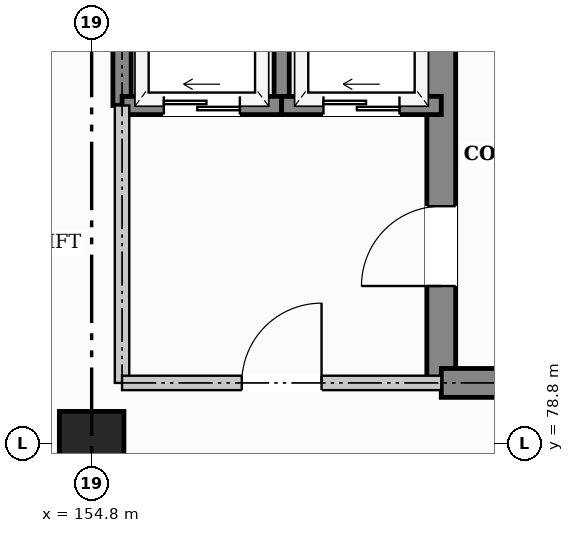
"""IFC4 building model, lengths in metres.
Left out: names, types, materials, properties, quantities, classifications, styles, units other than length and angle.
Written with IfcOpenShell. Run it as: python <this file> out.ifc"""

import sys

from ifc_helpers import new_model, si_unit, direction, frame, frame_2d, origin, origin_2d, place, context, subcontext, project, spatial, rectangle, extrude, element, fill, save


model = new_model("IFC4")
c1 = context("Model", 3, precision=1e-05, world=origin(), true_north=direction((0.0, 1.0)))
c2 = subcontext(c1, "Body", "Model", "MODEL_VIEW")
j1 = project(units=[si_unit("LENGTHUNIT", "METRE"), si_unit("PLANEANGLEUNIT", "RADIAN")], contexts=[c1])
p1 = place(None, origin())
s1 = spatial("IfcSite", under=j1, at=p1, CompositionType="ELEMENT")
p2 = place(p1, origin())
s2 = spatial("IfcBuilding", under=s1, at=p2, CompositionType="ELEMENT")
p3 = place(p2, frame((0.0, 0.0, 5.1)))
s3 = spatial("IfcBuildingStorey", under=s2, at=p3, CompositionType="ELEMENT", Elevation=5.1)
p4 = place(p3, frame((154.8, 78.8, 0.0), z_axis=(0.0, 0.0, 1.0), x_axis=(1.0, 0.0, 0.0)))
e1 = element("IfcColumn", 1, at=p4, inside=s3, PredefinedType="COLUMN", context=c2, shape_type="SweptSolid", body=[
    extrude(rectangle(XDim=0.85, YDim=0.85, at=origin_2d()), origin(), (0.0, 0.0, 1.0), 4.5),
])
p5 = place(p3, frame((159.4, 79.6, 0.0), z_axis=(0.0, 0.0, 1.0), x_axis=(0.0, 1.0, 0.0)))
e2 = element("IfcWall", 2, at=p5, inside=s3, PredefinedType="SHEAR", context=c2, shape_type="SweptSolid", body=[
    extrude(rectangle(XDim=6.0, YDim=0.38, at=frame_2d((3.0, 0.0))), origin(), (0.0, 0.0, 1.0), 4.22),
])
p6 = place(p5, frame((1.275, 0.0, 0.0)))
e3 = element("IfcOpeningElement", 3, at=p6, cuts=e2, PredefinedType="OPENING", context=c2, shape_type="SweptSolid", body=[
    extrude(rectangle(XDim=1.05, YDim=2.15, at=frame_2d((0.525, 1.075))), frame((0.0, 0.2, 0.0), z_axis=(0.0, -1.0, 0.0), x_axis=(1.0, 0.0, 0.0)), (0.0, 0.0, 1.0), 0.4),
])
p7 = place(p3, frame((159.4, 79.6, 0.0), z_axis=(0.0, 0.0, 1.0), x_axis=(1.0, 0.0, 0.0)))
e4 = element("IfcWall", 4, at=p7, inside=s3, PredefinedType="SHEAR", context=c2, shape_type="SweptSolid", body=[
    extrude(rectangle(XDim=7.0, YDim=0.38, at=frame_2d((3.5, 0.0))), origin(), (0.0, 0.0, 1.0), 4.22),
])
p8 = place(p3, frame((155.2, 83.25, 0.0), z_axis=(0.0, 0.0, 1.0), x_axis=(0.0, 1.0, 0.0)))
e5 = element("IfcWall", 5, at=p8, inside=s3, PredefinedType="SHEAR", context=c2, shape_type="SweptSolid", body=[
    extrude(rectangle(XDim=2.35, YDim=0.24, at=frame_2d((1.175, 0.0))), origin(), (0.0, 0.0, 1.0), 4.22),
])
p9 = place(p3, frame((157.3, 83.25, 0.0), z_axis=(0.0, 0.0, 1.0), x_axis=(0.0, 1.0, 0.0)))
e6 = element("IfcWall", 6, at=p9, inside=s3, PredefinedType="SHEAR", context=c2, shape_type="SweptSolid", body=[
    extrude(rectangle(XDim=2.35, YDim=0.2, at=frame_2d((1.175, 0.0))), origin(), (0.0, 0.0, 1.0), 4.22),
])
p10 = place(p3, frame((155.2, 83.25, 0.0), z_axis=(0.0, 0.0, 1.0), x_axis=(1.0, 0.0, 0.0)))
e7 = element("IfcWall", 7, at=p10, inside=s3, PredefinedType="SHEAR", context=c2, shape_type="SweptSolid", body=[
    extrude(rectangle(XDim=2.1, YDim=0.24, at=frame_2d((1.05, 0.0))), origin(), (0.0, 0.0, 1.0), 4.22),
])
p11 = place(p10, frame((0.55, 0.0, 0.0)))
e8 = element("IfcOpeningElement", 8, at=p11, cuts=e7, PredefinedType="OPENING", context=c2, shape_type="SweptSolid", body=[
    extrude(rectangle(XDim=1.0, YDim=2.1, at=frame_2d((0.5, 1.05))), frame((0.0, 0.13, 0.0), z_axis=(0.0, -1.0, 0.0), x_axis=(1.0, 0.0, 0.0)), (0.0, 0.0, 1.0), 0.26),
])
p12 = place(p3, frame((157.3, 83.25, 0.0), z_axis=(0.0, 0.0, 1.0), x_axis=(1.0, 0.0, 0.0)))
e9 = element("IfcWall", 9, at=p12, inside=s3, PredefinedType="SHEAR", context=c2, shape_type="SweptSolid", body=[
    extrude(rectangle(XDim=2.1, YDim=0.24, at=frame_2d((1.05, 0.0))), origin(), (0.0, 0.0, 1.0), 4.22),
])
p13 = place(p12, frame((0.55, 0.0, 0.0)))
e10 = element("IfcOpeningElement", 10, at=p13, cuts=e9, PredefinedType="OPENING", context=c2, shape_type="SweptSolid", body=[
    extrude(rectangle(XDim=1.0, YDim=2.1, at=frame_2d((0.5, 1.05))), frame((0.0, 0.13, 0.0), z_axis=(0.0, -1.0, 0.0), x_axis=(1.0, 0.0, 0.0)), (0.0, 0.0, 1.0), 0.26),
])
p14 = place(p3, frame((155.2, 79.6, 0.0), z_axis=(0.0, 0.0, 1.0), x_axis=(0.0, 1.0, 0.0)))
e11 = element("IfcWall", 11, at=p14, inside=s3, PredefinedType="PARTITIONING", context=c2, shape_type="SweptSolid", body=[
    extrude(rectangle(XDim=3.65, YDim=0.19, at=frame_2d((1.825, 0.0))), origin(), (0.0, 0.0, 1.0), 4.22),
])
p15 = place(p3, frame((155.2, 79.6, 0.0), z_axis=(0.0, 0.0, 1.0), x_axis=(1.0, 0.0, 0.0)))
e12 = element("IfcWall", 12, at=p15, inside=s3, PredefinedType="PARTITIONING", context=c2, shape_type="SweptSolid", body=[
    extrude(rectangle(XDim=4.2, YDim=0.19, at=frame_2d((2.1, 0.0))), origin(), (0.0, 0.0, 1.0), 4.22),
])
p16 = place(p15, frame((1.575, 0.0, 0.0)))
e13 = element("IfcOpeningElement", 13, at=p16, cuts=e12, PredefinedType="OPENING", context=c2, shape_type="SweptSolid", body=[
    extrude(rectangle(XDim=1.05, YDim=2.15, at=frame_2d((0.525, 1.075))), frame((0.0, 0.105, 0.0), z_axis=(0.0, -1.0, 0.0), x_axis=(1.0, 0.0, 0.0)), (0.0, 0.0, 1.0), 0.21),
])
p17 = place(p6, origin())
e14 = element("IfcDoor", 14, at=p17, inside=s3, OperationType="SINGLE_SWING_LEFT", PredefinedType="DOOR", context=c2, shape_type="SweptSolid", body=[
    extrude(rectangle(XDim=1.05, YDim=2.15, at=frame_2d((0.525, 1.075))), frame((0.0, 0.025, 0.0), z_axis=(0.0, -1.0, 0.0), x_axis=(1.0, 0.0, 0.0)), (0.0, 0.0, 1.0), 0.05),
])
fill(e3, e14)
p18 = place(p11, origin())
e15 = element("IfcDoor", 15, at=p18, inside=s3, OperationType="SLIDING_TO_LEFT", PredefinedType="DOOR", context=c2, shape_type="SweptSolid", body=[
    extrude(rectangle(XDim=1.0, YDim=2.1, at=frame_2d((0.5, 1.05))), frame((0.0, 0.025, 0.0), z_axis=(0.0, -1.0, 0.0), x_axis=(1.0, 0.0, 0.0)), (0.0, 0.0, 1.0), 0.05),
])
fill(e8, e15)
p19 = place(p13, origin())
e16 = element("IfcDoor", 16, at=p19, inside=s3, OperationType="SLIDING_TO_LEFT", PredefinedType="DOOR", context=c2, shape_type="SweptSolid", body=[
    extrude(rectangle(XDim=1.0, YDim=2.1, at=frame_2d((0.5, 1.05))), frame((0.0, 0.025, 0.0), z_axis=(0.0, -1.0, 0.0), x_axis=(1.0, 0.0, 0.0)), (0.0, 0.0, 1.0), 0.05),
])
fill(e10, e16)
p20 = place(p16, origin())
e17 = element("IfcDoor", 17, at=p20, inside=s3, OperationType="SINGLE_SWING_RIGHT", PredefinedType="DOOR", context=c2, shape_type="SweptSolid", body=[
    extrude(rectangle(XDim=1.05, YDim=2.15, at=frame_2d((0.525, 1.075))), frame((0.0, 0.025, 0.0), z_axis=(0.0, -1.0, 0.0), x_axis=(1.0, 0.0, 0.0)), (0.0, 0.0, 1.0), 0.05),
])
fill(e13, e17)
save(model, sys.argv[1])
